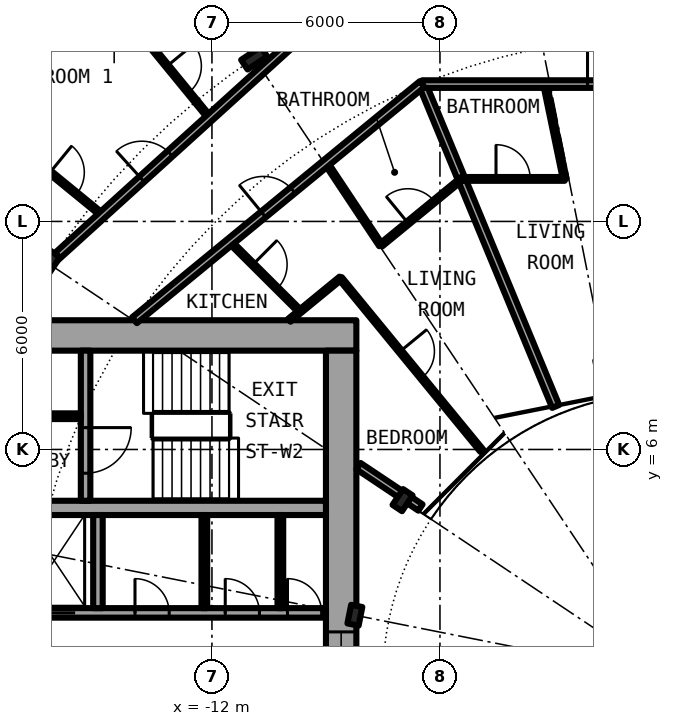
"""IFC4 building model, lengths in metres.
Left out: names, types, materials, properties, quantities, classifications, styles, units other than length and angle.
Written with IfcOpenShell. Run it as: python <this file> out.ifc"""

import sys

from ifc_helpers import new_model, si_unit, direction, frame, frame_2d, origin, origin_2d, place, context, subcontext, project, spatial, rectangle, i_section, extrude, element, fill, save


model = new_model("IFC4")
c1 = context("Model", 3, precision=1e-05, world=origin(), true_north=direction((0.0, 1.0)))
c2 = subcontext(c1, "Body", "Model", "MODEL_VIEW")
j1 = project(units=[si_unit("LENGTHUNIT", "METRE"), si_unit("PLANEANGLEUNIT", "RADIAN")], contexts=[c1])
p1 = place(None, origin())
s1 = spatial("IfcSite", under=j1, at=p1, CompositionType="ELEMENT")
p2 = place(p1, origin())
s2 = spatial("IfcBuilding", under=s1, at=p2, CompositionType="ELEMENT")
p3 = place(p2, frame((0.0, 0.0, 35.0)))
s3 = spatial("IfcBuildingStorey", under=s2, at=p3, CompositionType="ELEMENT", Elevation=35.0)
for number, where, z_axis, x_axis in (
    (1, (-10.889, 16.297, 0.0), (0.0, 0.0, 1.0), (-0.556, 0.831, 0.0)),
    (2, (-16.297, 10.889, 0.0), (0.0, 0.0, 1.0), (-0.831, 0.556, 0.0)),
):
    element("IfcColumn", number, at=place(p3, frame(where, z_axis=z_axis, x_axis=x_axis)), inside=s3, PredefinedType="COLUMN", context=c2, shape_type="SweptSolid", body=[
        extrude(i_section(OverallWidth=0.305, OverallDepth=0.62, WebThickness=0.021, FlangeThickness=0.04, FilletRadius=0.027, at=origin_2d()), origin(), (0.0, 0.0, 1.0), 3.05),
    ])
for number, where, z_axis, x_axis in (
    (3, (-6.984, 4.667, 0.0), (0.0, 0.0, 1.0), (-0.831, 0.556, 0.0)),
    (4, (-8.239, 1.639, 0.0), (0.0, 0.0, 1.0), (-0.981, 0.195, 0.0)),
):
    element("IfcColumn", number, at=place(p3, frame(where, z_axis=z_axis, x_axis=x_axis)), inside=s3, PredefinedType="COLUMN", context=c2, shape_type="SweptSolid", body=[
        extrude(i_section(OverallWidth=0.3, OverallDepth=0.5, WebThickness=0.014, FlangeThickness=0.028, FilletRadius=0.027, at=origin_2d()), origin(), (0.0, 0.0, 1.0), 3.05),
    ])
p4 = place(p3, frame((-8.2, 9.0, 0.0), z_axis=(0.0, 0.0, 1.0), x_axis=(-1.0, 0.0, 0.0)))
e5 = element("IfcWall", 5, at=p4, inside=s3, PredefinedType="SHEAR", context=c2, shape_type="SweptSolid", body=[
    extrude(rectangle(XDim=14.2, YDim=0.8, at=frame_2d((7.1, 0.0))), origin(), (0.0, 0.0, 1.0), 3.05),
])
p5 = place(p4, frame((11.675, 0.0, 0.0)))
e6 = element("IfcOpeningElement", 6, at=p5, cuts=e5, PredefinedType="OPENING", context=c2, shape_type="SweptSolid", body=[
    extrude(rectangle(XDim=1.2, YDim=2.3, at=frame_2d((0.6, 1.15))), frame((0.0, 0.41, 0.0), z_axis=(0.0, -1.0, 0.0), x_axis=(1.0, 0.0, 0.0)), (0.0, 0.0, 1.0), 0.82),
])
p6 = place(p3, frame((-8.6, 8.6, 0.0), z_axis=(0.0, 0.0, 1.0), x_axis=(0.0, -1.0, 0.0)))
e7 = element("IfcWall", 7, at=p6, inside=s3, PredefinedType="SHEAR", context=c2, shape_type="SweptSolid", body=[
    extrude(rectangle(XDim=17.2, YDim=0.8, at=frame_2d((8.6, 0.0))), origin(), (0.0, 0.0, 1.0), 3.05),
])
p7 = place(p6, frame((7.4, 0.0, 0.1)))
e8 = element("IfcOpeningElement", 8, at=p7, cuts=e7, PredefinedType="OPENING", context=c2, shape_type="SweptSolid", body=[
    extrude(rectangle(XDim=2.4, YDim=2.2, at=frame_2d((1.2, 1.1))), frame((0.0, 0.41, 0.0), z_axis=(0.0, -1.0, 0.0), x_axis=(1.0, 0.0, 0.0)), (0.0, 0.0, 1.0), 0.82),
])
p8 = place(p3, frame((-19.15, 1.7, 0.0), z_axis=(0.0, 0.0, 1.0), x_axis=(1.0, 0.0, 0.0)))
e9 = element("IfcWall", 9, at=p8, inside=s3, PredefinedType="SHEAR", context=c2, shape_type="SweptSolid", body=[
    extrude(rectangle(XDim=10.15, YDim=0.25, at=frame_2d((5.075, 0.0))), origin(), (0.0, 0.0, 1.0), 3.05),
])
p9 = place(p8, frame((2.45, 0.0, 0.0)))
e10 = element("IfcOpeningElement", 10, at=p9, cuts=e9, PredefinedType="OPENING", context=c2, shape_type="SweptSolid", body=[
    extrude(rectangle(XDim=1.1, YDim=2.3, at=frame_2d((0.55, 1.15))), frame((0.0, 0.135, 0.0), z_axis=(0.0, -1.0, 0.0), x_axis=(1.0, 0.0, 0.0)), (0.0, 0.0, 1.0), 0.27),
])
p10 = place(p8, frame((9.137, 0.0, 0.0)))
e11 = element("IfcOpeningElement", 11, at=p10, cuts=e9, PredefinedType="OPENING", context=c2, shape_type="SweptSolid", body=[
    extrude(rectangle(XDim=0.9, YDim=2.3, at=frame_2d((0.45, 1.15))), frame((0.0, 0.135, 0.0), z_axis=(0.0, -1.0, 0.0), x_axis=(1.0, 0.0, 0.0)), (0.0, 0.0, 1.0), 0.27),
])
p11 = place(p8, frame((7.5, 0.0, 0.0)))
e12 = element("IfcOpeningElement", 12, at=p11, cuts=e9, PredefinedType="OPENING", context=c2, shape_type="SweptSolid", body=[
    extrude(rectangle(XDim=0.9, YDim=2.3, at=frame_2d((0.45, 1.15))), frame((0.0, 0.135, 0.0), z_axis=(0.0, -1.0, 0.0), x_axis=(1.0, 0.0, 0.0)), (0.0, 0.0, 1.0), 0.27),
])
p12 = place(p8, frame((5.125, 0.0, 0.0)))
e13 = element("IfcOpeningElement", 13, at=p12, cuts=e9, PredefinedType="OPENING", context=c2, shape_type="SweptSolid", body=[
    extrude(rectangle(XDim=0.9, YDim=2.3, at=frame_2d((0.45, 1.15))), frame((0.0, 0.135, 0.0), z_axis=(0.0, -1.0, 0.0), x_axis=(1.0, 0.0, 0.0)), (0.0, 0.0, 1.0), 0.27),
])
p13 = place(p3, frame((-9.0, 4.462, 0.0), z_axis=(0.0, 0.0, 1.0), x_axis=(-1.0, 0.0, 0.0)))
e14 = element("IfcWall", 14, at=p13, inside=s3, PredefinedType="SHEAR", context=c2, shape_type="SweptSolid", body=[
    extrude(rectangle(XDim=10.15, YDim=0.375, at=frame_2d((5.075, 0.0))), origin(), (0.0, 0.0, 1.0), 3.05),
])
p14 = place(p3, frame((-15.325, 8.6, 0.0), z_axis=(0.0, 0.0, 1.0), x_axis=(0.0, -1.0, 0.0)))
e15 = element("IfcWall", 15, at=p14, inside=s3, PredefinedType="SHEAR", context=c2, shape_type="SweptSolid", body=[
    extrude(rectangle(XDim=3.95, YDim=0.25, at=frame_2d((1.975, 0.0))), origin(), (0.0, 0.0, 1.0), 3.05),
])
p15 = place(p14, frame((2.025, 0.0, 0.0)))
e16 = element("IfcOpeningElement", 16, at=p15, cuts=e15, PredefinedType="OPENING", context=c2, shape_type="SweptSolid", body=[
    extrude(rectangle(XDim=1.2, YDim=2.3, at=frame_2d((0.6, 1.15))), frame((0.0, 0.135, 0.0), z_axis=(0.0, -1.0, 0.0), x_axis=(1.0, 0.0, 0.0)), (0.0, 0.0, 1.0), 0.27),
])
p16 = place(p3, frame((-15.0, 1.825, 0.0), z_axis=(0.0, 0.0, 1.0), x_axis=(0.0, 1.0, 0.0)))
e17 = element("IfcWall", 17, at=p16, inside=s3, PredefinedType="SOLIDWALL", context=c2, shape_type="SweptSolid", body=[
    extrude(rectangle(XDim=2.45, YDim=0.25, at=frame_2d((1.225, 0.0))), origin(), (0.0, 0.0, 1.0), 2.7),
])
for number, where, z_axis, x_axis in (
    (18, (-10.2, 1.825, 0.0), (0.0, 0.0, 1.0), (0.0, 1.0, 0.0)),
    (19, (-12.2, 1.825, 0.0), (0.0, 0.0, 1.0), (0.0, 1.0, 0.0)),
):
    element("IfcWall", number, at=place(p3, frame(where, z_axis=z_axis, x_axis=x_axis)), inside=s3, PredefinedType="PARTITIONING", context=c2, shape_type="SweptSolid", body=[
        extrude(rectangle(XDim=2.45, YDim=0.15, at=frame_2d((1.225, 0.0))), origin(), (0.0, 0.0, 1.0), 2.7),
    ])
p17 = place(p3, frame((-15.45, 6.875, 0.0), z_axis=(0.0, 0.0, 1.0), x_axis=(-1.0, 0.0, 0.0)))
e20 = element("IfcWall", 20, at=p17, inside=s3, PredefinedType="PARTITIONING", context=c2, shape_type="SweptSolid", body=[
    extrude(rectangle(XDim=3.7, YDim=0.15, at=frame_2d((1.85, 0.0))), origin(), (0.0, 0.0, 1.0), 2.7),
])
p18 = place(p17, frame((1.4, 0.0, 0.0)))
e21 = element("IfcOpeningElement", 21, at=p18, cuts=e20, PredefinedType="OPENING", context=c2, shape_type="SweptSolid", body=[
    extrude(rectangle(XDim=0.9, YDim=2.3, at=frame_2d((0.45, 1.15))), frame((0.0, 0.085, 0.0), z_axis=(0.0, -1.0, 0.0), x_axis=(1.0, 0.0, 0.0)), (0.0, 0.0, 1.0), 0.17),
])
p19 = place(p3, frame((-17.219, 21.023, 0.0), z_axis=(0.0, 0.0, 1.0), x_axis=(0.633664062855, -0.773608334654, 0.0)))
e22 = element("IfcWall", 22, at=p19, inside=s3, PredefinedType="PARTITIONING", context=c2, shape_type="SweptSolid", body=[
    extrude(rectangle(XDim=8.138, YDim=0.1, at=frame_2d((4.069, 0.0))), origin(), (0.0, 0.0, 1.0), 2.7),
])
p20 = place(p19, frame((6.377, 0.0, 0.0)))
e23 = element("IfcOpeningElement", 23, at=p20, cuts=e22, PredefinedType="OPENING", context=c2, shape_type="SweptSolid", body=[
    extrude(rectangle(XDim=0.9, YDim=2.3, at=frame_2d((0.45, 1.15))), frame((0.0, 0.06, 0.0), z_axis=(0.0, -1.0, 0.0), x_axis=(1.0, 0.0, 0.0)), (0.0, 0.0, 1.0), 0.12),
])
p21 = place(p19, frame((2.308, 0.0, 0.0)))
e24 = element("IfcOpeningElement", 24, at=p21, cuts=e22, PredefinedType="OPENING", context=c2, shape_type="SweptSolid", body=[
    extrude(rectangle(XDim=0.9, YDim=2.3, at=frame_2d((0.45, 1.15))), frame((0.0, 0.06, 0.0), z_axis=(0.0, -1.0, 0.0), x_axis=(1.0, 0.0, 0.0)), (0.0, 0.0, 1.0), 0.12),
])
p22 = place(p3, frame((-16.936, 13.845, 0.0), z_axis=(0.0, 0.0, 1.0), x_axis=(0.774162545943, -0.632986850147, 0.0)))
e25 = element("IfcWall", 25, at=p22, inside=s3, PredefinedType="PARTITIONING", context=c2, shape_type="SweptSolid", body=[
    extrude(rectangle(XDim=2.649, YDim=0.1, at=frame_2d((1.325, 0.0))), origin(), (0.0, 0.0, 1.0), 2.7),
])
p23 = place(p22, frame((0.875, 0.0, 0.0)))
e26 = element("IfcOpeningElement", 26, at=p23, cuts=e25, PredefinedType="OPENING", context=c2, shape_type="SweptSolid", body=[
    extrude(rectangle(XDim=0.9, YDim=2.3, at=frame_2d((0.45, 1.15))), frame((0.0, 0.06, 0.0), z_axis=(0.0, -1.0, 0.0), x_axis=(1.0, 0.0, 0.0)), (0.0, 0.0, 1.0), 0.12),
])
p24 = place(p3, frame((-11.524, 11.464, 0.0), z_axis=(0.0, 0.0, 1.0), x_axis=(0.708796844581, -0.705412668665, 0.0)))
e27 = element("IfcWall", 27, at=p24, inside=s3, PredefinedType="PARTITIONING", context=c2, shape_type="SweptSolid", body=[
    extrude(rectangle(XDim=2.597, YDim=0.1, at=frame_2d((1.299, 0.0))), origin(), (0.0, 0.0, 1.0), 2.7),
])
p25 = place(p24, frame((0.849, 0.0, 0.0)))
e28 = element("IfcOpeningElement", 28, at=p25, cuts=e27, PredefinedType="OPENING", context=c2, shape_type="SweptSolid", body=[
    extrude(rectangle(XDim=0.9, YDim=2.3, at=frame_2d((0.45, 1.15))), frame((0.0, 0.06, 0.0), z_axis=(0.0, -1.0, 0.0), x_axis=(1.0, 0.0, 0.0)), (0.0, 0.0, 1.0), 0.12),
])
p26 = place(p3, frame((-8.996, 13.539, 0.0), z_axis=(0.0, 0.0, 1.0), x_axis=(0.553615197403, -0.83277260594, 0.0)))
e29 = element("IfcWall", 29, at=p26, inside=s3, PredefinedType="PARTITIONING", context=c2, shape_type="SweptSolid", body=[
    extrude(rectangle(XDim=2.597, YDim=0.1, at=frame_2d((1.299, 0.0))), origin(), (0.0, 0.0, 1.0), 2.7),
])
p27 = place(p3, frame((-8.621, 10.503, 0.0), z_axis=(0.0, 0.0, 1.0), x_axis=(0.634358693064, -0.773038840249, 0.0)))
e30 = element("IfcWall", 30, at=p27, inside=s3, PredefinedType="PARTITIONING", context=c2, shape_type="SweptSolid", body=[
    extrude(rectangle(XDim=5.868, YDim=0.1, at=frame_2d((2.934, 0.0))), origin(), (0.0, 0.0, 1.0), 2.7),
])
p28 = place(p27, frame((2.484, 0.0, 0.0)))
e31 = element("IfcOpeningElement", 31, at=p28, cuts=e30, PredefinedType="OPENING", context=c2, shape_type="SweptSolid", body=[
    extrude(rectangle(XDim=0.9, YDim=2.3, at=frame_2d((0.45, 1.15))), frame((0.0, 0.06, 0.0), z_axis=(0.0, -1.0, 0.0), x_axis=(1.0, 0.0, 0.0)), (0.0, 0.0, 1.0), 0.12),
])
p29 = place(p3, frame((-6.467, 15.614, 0.0), z_axis=(0.0, 0.0, 1.0), x_axis=(0.382556139466, -0.923932248683, 0.0)))
e32 = element("IfcWall", 32, at=p29, inside=s3, PredefinedType="PARTITIONING", context=c2, shape_type="SweptSolid", body=[
    extrude(rectangle(XDim=9.18, YDim=0.2, at=frame_2d((4.59, 0.0))), origin(), (0.0, 0.0, 1.0), 2.7),
])
p30 = place(p3, frame((-3.234, 15.614, 0.0), z_axis=(0.0, 0.0, 1.0), x_axis=(0.202836883315, -0.97921254014, 0.0)))
e33 = element("IfcWall", 33, at=p30, inside=s3, PredefinedType="PARTITIONING", context=c2, shape_type="SweptSolid", body=[
    extrude(rectangle(XDim=2.548, YDim=0.1, at=frame_2d((1.274, 0.0))), origin(), (0.0, 0.0, 1.0), 2.7),
])
p31 = place(p3, frame((-6.513, 4.472, 0.0), z_axis=(0.0, 0.0, 1.0), x_axis=(-0.831417956244, 0.555647533996, 0.0)))
e34 = element("IfcWall", 34, at=p31, inside=s3, PredefinedType="PARTITIONING", context=c2, shape_type="SweptSolid", body=[
    extrude(rectangle(XDim=1.962, YDim=0.2, at=frame_2d((0.981, 0.0))), origin(), (0.0, 0.0, 1.0), 2.7),
])
p32 = place(p3, frame((-5.434, 13.119, 0.0), z_axis=(0.0, 0.0, 1.0), x_axis=(1.0, 0.0, 0.0)))
e35 = element("IfcWall", 35, at=p32, inside=s3, PredefinedType="PARTITIONING", context=c2, shape_type="SweptSolid", body=[
    extrude(rectangle(XDim=2.717, YDim=0.1, at=frame_2d((1.358, 0.0))), origin(), (0.0, 0.0, 1.0), 2.7),
])
p33 = place(p32, frame((0.909, 0.0, 0.0)))
e36 = element("IfcOpeningElement", 36, at=p33, cuts=e35, PredefinedType="OPENING", context=c2, shape_type="SweptSolid", body=[
    extrude(rectangle(XDim=0.9, YDim=2.3, at=frame_2d((0.45, 1.15))), frame((0.0, 0.06, 0.0), z_axis=(0.0, -1.0, 0.0), x_axis=(1.0, 0.0, 0.0)), (0.0, 0.0, 1.0), 0.12),
])
p34 = place(p3, frame((-9.965, 9.4, 0.0), z_axis=(0.0, 0.0, 1.0), x_axis=(0.773141825369, 0.634233173104, 0.0)))
e37 = element("IfcWall", 37, at=p34, inside=s3, PredefinedType="PARTITIONING", context=c2, shape_type="SweptSolid", body=[
    extrude(rectangle(XDim=1.749, YDim=0.1, at=frame_2d((0.875, 0.0))), origin(), (0.0, 0.0, 1.0), 2.7),
])
p35 = place(p3, frame((-7.552, 11.379, 0.0), z_axis=(0.0, 0.0, 1.0), x_axis=(0.773323547924, 0.634011585246, 0.0)))
e38 = element("IfcWall", 38, at=p35, inside=s3, PredefinedType="PARTITIONING", context=c2, shape_type="SweptSolid", body=[
    extrude(rectangle(XDim=2.748, YDim=0.1, at=frame_2d((1.374, 0.0))), origin(), (0.0, 0.0, 1.0), 2.7),
])
p36 = place(p35, frame((0.917, 0.0, 0.0)))
e39 = element("IfcOpeningElement", 39, at=p36, cuts=e38, PredefinedType="OPENING", context=c2, shape_type="SweptSolid", body=[
    extrude(rectangle(XDim=0.9, YDim=2.3, at=frame_2d((0.45, 1.15))), frame((0.0, 0.06, 0.0), z_axis=(0.0, -1.0, 0.0), x_axis=(1.0, 0.0, 0.0)), (0.0, 0.0, 1.0), 0.12),
])
p37 = place(p3, frame((-6.467, 15.614, 0.0), z_axis=(0.0, 0.0, 1.0), x_axis=(1.0, 0.0, 0.0)))
e40 = element("IfcWall", 40, at=p37, inside=s3, PredefinedType="PARTITIONING", context=c2, shape_type="SweptSolid", body=[
    extrude(rectangle(XDim=12.934, YDim=0.2, at=frame_2d((6.467, 0.0))), origin(), (0.0, 0.0, 1.0), 2.7),
])
p38 = place(p37, frame((4.35, 0.0, 0.0)))
e41 = element("IfcOpeningElement", 41, at=p38, cuts=e40, PredefinedType="OPENING", context=c2, shape_type="SweptSolid", body=[
    extrude(rectangle(XDim=1.0, YDim=2.3, at=frame_2d((0.5, 1.15))), frame((0.0, 0.11, 0.0), z_axis=(0.0, -1.0, 0.0), x_axis=(1.0, 0.0, 0.0)), (0.0, 0.0, 1.0), 0.22),
])
p39 = place(p3, frame((-14.039, 9.4, 0.0), z_axis=(0.0, 0.0, 1.0), x_axis=(0.77298340166, 0.634426245326, 0.0)))
e42 = element("IfcWall", 42, at=p39, inside=s3, PredefinedType="PARTITIONING", context=c2, shape_type="SweptSolid", body=[
    extrude(rectangle(XDim=9.793, YDim=0.2, at=frame_2d((4.896, 0.0))), origin(), (0.0, 0.0, 1.0), 2.7),
])
p40 = place(p39, frame((4.389, 0.0, 0.0)))
e43 = element("IfcOpeningElement", 43, at=p40, cuts=e42, PredefinedType="OPENING", context=c2, shape_type="SweptSolid", body=[
    extrude(rectangle(XDim=1.0, YDim=2.3, at=frame_2d((0.5, 1.15))), frame((0.0, 0.11, 0.0), z_axis=(0.0, -1.0, 0.0), x_axis=(1.0, 0.0, 0.0)), (0.0, 0.0, 1.0), 0.22),
])
p41 = place(p3, frame((-16.18, 10.995, 0.0), z_axis=(0.0, 0.0, 1.0), x_axis=(0.74112906966, 0.671362571272, 0.0)))
e44 = element("IfcWall", 44, at=p41, inside=s3, PredefinedType="PARTITIONING", context=c2, shape_type="SweptSolid", body=[
    extrude(rectangle(XDim=9.375, YDim=0.2, at=frame_2d((4.688, 0.0))), origin(), (0.0, 0.0, 1.0), 2.38),
])
p42 = place(p41, frame((3.152, 0.0, 0.0)))
e45 = element("IfcOpeningElement", 45, at=p42, cuts=e44, PredefinedType="OPENING", context=c2, shape_type="SweptSolid", body=[
    extrude(rectangle(XDim=1.0, YDim=2.3, at=frame_2d((0.5, 1.15))), frame((0.0, 0.11, 0.0), z_axis=(0.0, -1.0, 0.0), x_axis=(1.0, 0.0, 0.0)), (0.0, 0.0, 1.0), 0.22),
])
p43 = place(p9, origin())
e46 = element("IfcDoor", 46, at=p43, inside=s3, OperationType="DOUBLE_DOOR_SLIDING", PredefinedType="DOOR", context=c2, shape_type="SweptSolid", body=[
    extrude(rectangle(XDim=1.1, YDim=2.3, at=frame_2d((0.55, 1.15))), frame((0.0, 0.025, 0.0), z_axis=(0.0, -1.0, 0.0), x_axis=(1.0, 0.0, 0.0)), (0.0, 0.0, 1.0), 0.05),
])
fill(e10, e46)
p44 = place(p10, origin())
e47 = element("IfcDoor", 47, at=p44, inside=s3, OperationType="SINGLE_SWING_LEFT", PredefinedType="DOOR", context=c2, shape_type="SweptSolid", body=[
    extrude(rectangle(XDim=0.9, YDim=2.3, at=frame_2d((0.45, 1.15))), frame((0.0, 0.025, 0.0), z_axis=(0.0, -1.0, 0.0), x_axis=(1.0, 0.0, 0.0)), (0.0, 0.0, 1.0), 0.05),
])
fill(e11, e47)
p45 = place(p11, origin())
e48 = element("IfcDoor", 48, at=p45, inside=s3, OperationType="SINGLE_SWING_LEFT", PredefinedType="DOOR", context=c2, shape_type="SweptSolid", body=[
    extrude(rectangle(XDim=0.9, YDim=2.3, at=frame_2d((0.45, 1.15))), frame((0.0, 0.025, 0.0), z_axis=(0.0, -1.0, 0.0), x_axis=(1.0, 0.0, 0.0)), (0.0, 0.0, 1.0), 0.05),
])
fill(e12, e48)
p46 = place(p12, origin())
e49 = element("IfcDoor", 49, at=p46, inside=s3, OperationType="SINGLE_SWING_LEFT", PredefinedType="DOOR", context=c2, shape_type="SweptSolid", body=[
    extrude(rectangle(XDim=0.9, YDim=2.3, at=frame_2d((0.45, 1.15))), frame((0.0, 0.025, 0.0), z_axis=(0.0, -1.0, 0.0), x_axis=(1.0, 0.0, 0.0)), (0.0, 0.0, 1.0), 0.05),
])
fill(e13, e49)
p47 = place(p15, origin())
e50 = element("IfcDoor", 50, at=p47, inside=s3, OperationType="SINGLE_SWING_LEFT", PredefinedType="DOOR", context=c2, shape_type="SweptSolid", body=[
    extrude(rectangle(XDim=1.2, YDim=2.3, at=frame_2d((0.6, 1.15))), frame((0.0, 0.025, 0.0), z_axis=(0.0, -1.0, 0.0), x_axis=(1.0, 0.0, 0.0)), (0.0, 0.0, 1.0), 0.05),
])
fill(e16, e50)
p48 = place(p7, origin())
e51 = element("IfcWindow", 51, at=p48, inside=s3, PartitioningType="SINGLE_PANEL", PredefinedType="WINDOW", context=c2, shape_type="SweptSolid", body=[
    extrude(rectangle(XDim=2.4, YDim=2.2, at=frame_2d((1.2, 1.1))), frame((0.0, 0.03, 0.0), z_axis=(0.0, -1.0, 0.0), x_axis=(1.0, 0.0, 0.0)), (0.0, 0.0, 1.0), 0.06),
])
fill(e8, e51)
p49 = place(p42, origin())
e52 = element("IfcDoor", 52, at=p49, inside=s3, OperationType="SINGLE_SWING_LEFT", PredefinedType="DOOR", context=c2, shape_type="SweptSolid", body=[
    extrude(rectangle(XDim=1.0, YDim=2.3, at=frame_2d((0.5, 1.15))), frame((0.0, 0.025, 0.0), z_axis=(0.0, -1.0, 0.0), x_axis=(1.0, 0.0, 0.0)), (0.0, 0.0, 1.0), 0.05),
])
fill(e45, e52)
p50 = place(p23, origin())
e53 = element("IfcDoor", 53, at=p50, inside=s3, OperationType="SINGLE_SWING_LEFT", PredefinedType="DOOR", context=c2, shape_type="SweptSolid", body=[
    extrude(rectangle(XDim=0.9, YDim=2.3, at=frame_2d((0.45, 1.15))), frame((0.0, 0.025, 0.0), z_axis=(0.0, -1.0, 0.0), x_axis=(1.0, 0.0, 0.0)), (0.0, 0.0, 1.0), 0.05),
])
fill(e26, e53)
p51 = place(p20, origin())
e54 = element("IfcDoor", 54, at=p51, inside=s3, OperationType="SINGLE_SWING_RIGHT", PredefinedType="DOOR", context=c2, shape_type="SweptSolid", body=[
    extrude(rectangle(XDim=0.9, YDim=2.3, at=frame_2d((0.45, 1.15))), frame((0.0, 0.025, 0.0), z_axis=(0.0, -1.0, 0.0), x_axis=(1.0, 0.0, 0.0)), (0.0, 0.0, 1.0), 0.05),
])
fill(e23, e54)
p52 = place(p38, origin())
e55 = element("IfcDoor", 55, at=p52, inside=s3, OperationType="SINGLE_SWING_LEFT", PredefinedType="DOOR", context=c2, shape_type="SweptSolid", body=[
    extrude(rectangle(XDim=1.0, YDim=2.3, at=frame_2d((0.5, 1.15))), frame((0.0, 0.025, 0.0), z_axis=(0.0, -1.0, 0.0), x_axis=(1.0, 0.0, 0.0)), (0.0, 0.0, 1.0), 0.05),
])
fill(e41, e55)
p53 = place(p33, origin())
e56 = element("IfcDoor", 56, at=p53, inside=s3, OperationType="SINGLE_SWING_RIGHT", PredefinedType="DOOR", context=c2, shape_type="SweptSolid", body=[
    extrude(rectangle(XDim=0.9, YDim=2.3, at=frame_2d((0.45, 1.15))), frame((0.0, 0.025, 0.0), z_axis=(0.0, -1.0, 0.0), x_axis=(1.0, 0.0, 0.0)), (0.0, 0.0, 1.0), 0.05),
])
fill(e36, e56)
p54 = place(p40, origin())
e57 = element("IfcDoor", 57, at=p54, inside=s3, OperationType="SINGLE_SWING_LEFT", PredefinedType="DOOR", context=c2, shape_type="SweptSolid", body=[
    extrude(rectangle(XDim=1.0, YDim=2.3, at=frame_2d((0.5, 1.15))), frame((0.0, 0.025, 0.0), z_axis=(0.0, -1.0, 0.0), x_axis=(1.0, 0.0, 0.0)), (0.0, 0.0, 1.0), 0.05),
])
fill(e43, e57)
p55 = place(p36, origin())
e58 = element("IfcDoor", 58, at=p55, inside=s3, OperationType="SINGLE_SWING_LEFT", PredefinedType="DOOR", context=c2, shape_type="SweptSolid", body=[
    extrude(rectangle(XDim=0.9, YDim=2.3, at=frame_2d((0.45, 1.15))), frame((0.0, 0.025, 0.0), z_axis=(0.0, -1.0, 0.0), x_axis=(1.0, 0.0, 0.0)), (0.0, 0.0, 1.0), 0.05),
])
fill(e39, e58)
p56 = place(p25, origin())
e59 = element("IfcDoor", 59, at=p56, inside=s3, OperationType="SINGLE_SWING_RIGHT", PredefinedType="DOOR", context=c2, shape_type="SweptSolid", body=[
    extrude(rectangle(XDim=0.9, YDim=2.3, at=frame_2d((0.45, 1.15))), frame((0.0, 0.025, 0.0), z_axis=(0.0, -1.0, 0.0), x_axis=(1.0, 0.0, 0.0)), (0.0, 0.0, 1.0), 0.05),
])
fill(e28, e59)
p57 = place(p28, origin())
e60 = element("IfcDoor", 60, at=p57, inside=s3, OperationType="SINGLE_SWING_LEFT", PredefinedType="DOOR", context=c2, shape_type="SweptSolid", body=[
    extrude(rectangle(XDim=0.9, YDim=2.3, at=frame_2d((0.45, 1.15))), frame((0.0, 0.025, 0.0), z_axis=(0.0, -1.0, 0.0), x_axis=(1.0, 0.0, 0.0)), (0.0, 0.0, 1.0), 0.05),
])
fill(e31, e60)
save(model, sys.argv[1])
